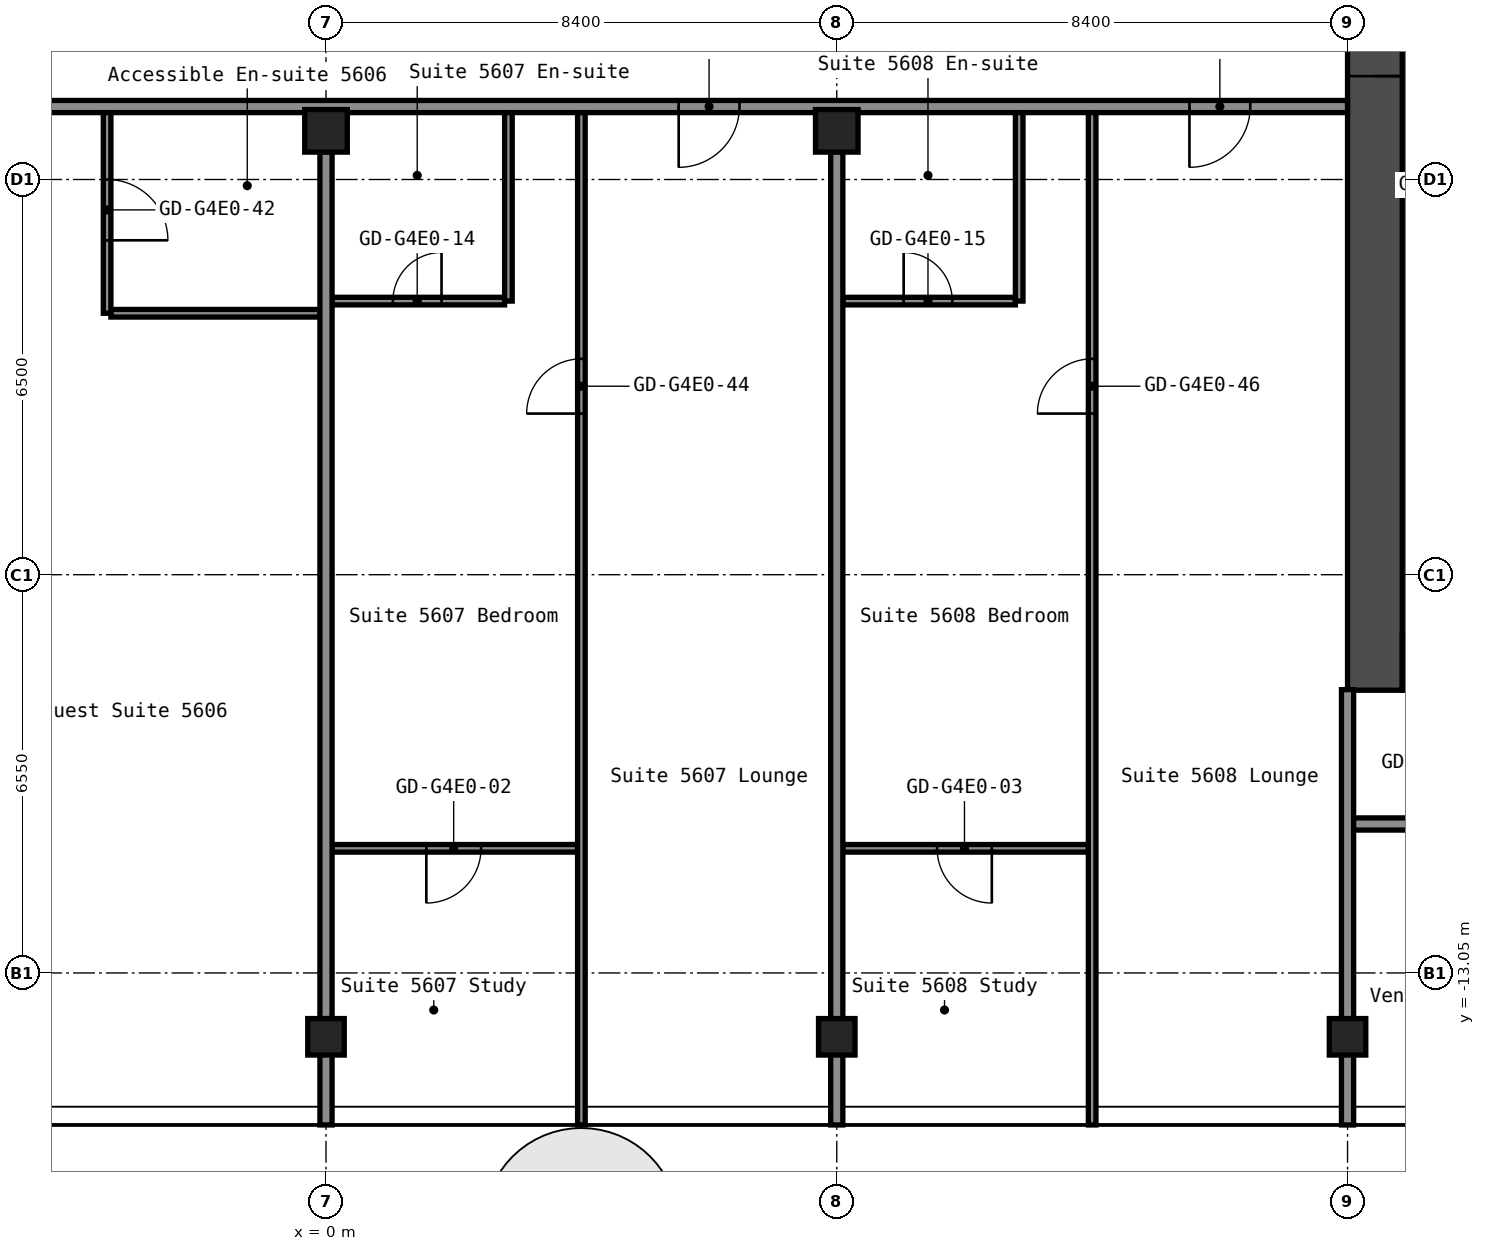
"""IFC4 building model, lengths in metres.
Left out: names, types, materials, properties, quantities, classifications, styles, units other than length and angle.
Written with IfcOpenShell. Run it as: python <this file> out.ifc"""

import sys

from ifc_helpers import new_model, si_unit, direction, frame, frame_2d, origin, origin_2d, place, context, subcontext, project, spatial, rectangle, hollow_rectangle, extrude, element, fill, save


model = new_model("IFC4")
c1 = context("Model", 3, precision=1e-05, world=origin(), true_north=direction((0.0, 1.0)))
c2 = subcontext(c1, "Body", "Model", "MODEL_VIEW")
j1 = project(units=[si_unit("LENGTHUNIT", "METRE"), si_unit("PLANEANGLEUNIT", "RADIAN")], contexts=[c1])
p1 = place(None, origin())
s1 = spatial("IfcSite", under=j1, at=p1, CompositionType="ELEMENT")
p2 = place(p1, origin())
s2 = spatial("IfcBuilding", under=s1, at=p2, CompositionType="ELEMENT")
p3 = place(p2, frame((0.0, 0.0, 199.4)))
s3 = spatial("IfcBuildingStorey", under=s2, at=p3, CompositionType="ELEMENT", Elevation=199.4)
p4 = place(p3, frame((0.0, -14.1, 0.0), z_axis=(0.0, 0.0, 1.0), x_axis=(1.0, 0.0, 0.0)))
e1 = element("IfcColumn", 1, at=p4, inside=s3, PredefinedType="COLUMN", context=c2, shape_type="SweptSolid", body=[
    extrude(hollow_rectangle(XDim=0.6, YDim=0.6, WallThickness=0.025, InnerFilletRadius=0.038, OuterFilletRadius=0.062, at=origin_2d()), origin(), (0.0, 0.0, 1.0), 2.75),
])
p5 = place(p3, frame((0.0, 0.8, 0.0), z_axis=(0.0, 0.0, 1.0), x_axis=(1.0, 0.0, 0.0)))
e2 = element("IfcColumn", 2, at=p5, inside=s3, PredefinedType="COLUMN", context=c2, shape_type="SweptSolid", body=[
    extrude(hollow_rectangle(XDim=0.7, YDim=0.7, WallThickness=0.028, at=origin_2d()), origin(), (0.0, 0.0, 1.0), 2.75),
])
p6 = place(p3, frame((8.4, -14.1, 0.0), z_axis=(0.0, 0.0, 1.0), x_axis=(1.0, 0.0, 0.0)))
e3 = element("IfcColumn", 3, at=p6, inside=s3, PredefinedType="COLUMN", context=c2, shape_type="SweptSolid", body=[
    extrude(hollow_rectangle(XDim=0.6, YDim=0.6, WallThickness=0.025, InnerFilletRadius=0.038, OuterFilletRadius=0.062, at=origin_2d()), origin(), (0.0, 0.0, 1.0), 2.75),
])
p7 = place(p3, frame((8.4, 0.8, 0.0), z_axis=(0.0, 0.0, 1.0), x_axis=(1.0, 0.0, 0.0)))
e4 = element("IfcColumn", 4, at=p7, inside=s3, PredefinedType="COLUMN", context=c2, shape_type="SweptSolid", body=[
    extrude(hollow_rectangle(XDim=0.7, YDim=0.7, WallThickness=0.028, at=origin_2d()), origin(), (0.0, 0.0, 1.0), 2.75),
])
p8 = place(p3, frame((16.8, -14.1, 0.0), z_axis=(0.0, 0.0, 1.0), x_axis=(1.0, 0.0, 0.0)))
e5 = element("IfcColumn", 5, at=p8, inside=s3, PredefinedType="COLUMN", context=c2, shape_type="SweptSolid", body=[
    extrude(hollow_rectangle(XDim=0.6, YDim=0.6, WallThickness=0.025, InnerFilletRadius=0.038, OuterFilletRadius=0.062, at=origin_2d()), origin(), (0.0, 0.0, 1.0), 2.75),
])
p9 = place(p3, frame((17.25, -8.4, 0.0), z_axis=(0.0, 0.0, 1.0), x_axis=(0.0, 1.0, 0.0)))
e6 = element("IfcWall", 6, at=p9, inside=s3, PredefinedType="SHEAR", context=c2, shape_type="SweptSolid", body=[
    extrude(rectangle(XDim=16.8, YDim=0.9, at=frame_2d((8.4, 0.0))), origin(), (0.0, 0.0, 1.0), 2.75),
])
p10 = place(p9, frame((10.1, 0.0, 0.0)))
e7 = element("IfcOpeningElement", 7, at=p10, cuts=e6, PredefinedType="OPENING", context=c2, shape_type="SweptSolid", body=[
    extrude(rectangle(XDim=1.6, YDim=2.1, at=frame_2d((0.8, 1.05))), frame((0.0, 0.46, 0.0), z_axis=(0.0, -1.0, 0.0), x_axis=(1.0, 0.0, 0.0)), (0.0, 0.0, 1.0), 0.92),
])
p11 = place(p3, frame((17.7, -7.95, 0.0), z_axis=(0.0, 0.0, 1.0), x_axis=(1.0, 0.0, 0.0)))
e8 = element("IfcWall", 8, at=p11, inside=s3, PredefinedType="SHEAR", context=c2, shape_type="SweptSolid", body=[
    extrude(rectangle(XDim=15.0, YDim=0.9, at=frame_2d((7.5, 0.0))), origin(), (0.0, 0.0, 1.0), 2.75),
])
p12 = place(p11, frame((2.55, 0.0, 0.0)))
e9 = element("IfcOpeningElement", 9, at=p12, cuts=e8, PredefinedType="OPENING", context=c2, shape_type="SweptSolid", body=[
    extrude(rectangle(XDim=1.0, YDim=2.1, at=frame_2d((0.5, 1.05))), frame((0.0, 0.46, 0.0), z_axis=(0.0, -1.0, 0.0), x_axis=(1.0, 0.0, 0.0)), (0.0, 0.0, 1.0), 0.92),
])
p13 = place(p3, frame((0.1, -11.0, 0.0), z_axis=(0.0, 0.0, 1.0), x_axis=(1.0, 0.0, 0.0)))
e10 = element("IfcWall", 10, at=p13, inside=s3, PredefinedType="PARTITIONING", context=c2, shape_type="SweptSolid", body=[
    extrude(rectangle(XDim=4.037, YDim=0.125, at=frame_2d((2.019, 0.0))), origin(), (0.0, 0.0, 1.0), 2.75),
])
p14 = place(p13, frame((1.55, 0.0, 0.0)))
e11 = element("IfcOpeningElement", 11, at=p14, cuts=e10, PredefinedType="OPENING", context=c2, shape_type="SweptSolid", body=[
    extrude(rectangle(XDim=0.9, YDim=2.1, at=frame_2d((0.45, 1.05))), frame((0.0, 0.073, 0.0), z_axis=(0.0, -1.0, 0.0), x_axis=(1.0, 0.0, 0.0)), (0.0, 0.0, 1.0), 0.145),
])
p15 = place(p3, frame((8.5, -11.0, 0.0), z_axis=(0.0, 0.0, 1.0), x_axis=(1.0, 0.0, 0.0)))
e12 = element("IfcWall", 12, at=p15, inside=s3, PredefinedType="PARTITIONING", context=c2, shape_type="SweptSolid", body=[
    extrude(rectangle(XDim=4.038, YDim=0.125, at=frame_2d((2.019, 0.0))), origin(), (0.0, 0.0, 1.0), 2.75),
])
p16 = place(p15, frame((1.55, 0.0, 0.0)))
e13 = element("IfcOpeningElement", 13, at=p16, cuts=e12, PredefinedType="OPENING", context=c2, shape_type="SweptSolid", body=[
    extrude(rectangle(XDim=0.9, YDim=2.1, at=frame_2d((0.45, 1.05))), frame((0.0, 0.073, 0.0), z_axis=(0.0, -1.0, 0.0), x_axis=(1.0, 0.0, 0.0)), (0.0, 0.0, 1.0), 0.145),
])
p17 = place(p3, frame((16.8, -10.6, 0.0), z_axis=(0.0, 0.0, 1.0), x_axis=(1.0, 0.0, 0.0)))
e14 = element("IfcWall", 14, at=p17, inside=s3, PredefinedType="PARTITIONING", context=c2, shape_type="SweptSolid", body=[
    extrude(rectangle(XDim=21.3, YDim=0.2, at=frame_2d((10.65, 0.0))), origin(), (0.0, 0.0, 1.0), 2.75),
])
p18 = place(p17, frame((1.06, 0.0, 0.0)))
e15 = element("IfcOpeningElement", 15, at=p18, cuts=e14, PredefinedType="OPENING", context=c2, shape_type="SweptSolid", body=[
    extrude(rectangle(XDim=0.9, YDim=2.1, at=frame_2d((0.45, 1.05))), frame((0.0, 0.11, 0.0), z_axis=(0.0, -1.0, 0.0), x_axis=(1.0, 0.0, 0.0)), (0.0, 0.0, 1.0), 0.22),
])
p19 = place(p17, frame((5.26, 0.0, 0.0)))
e16 = element("IfcOpeningElement", 16, at=p19, cuts=e14, PredefinedType="OPENING", context=c2, shape_type="SweptSolid", body=[
    extrude(rectangle(XDim=0.9, YDim=2.1, at=frame_2d((0.45, 1.05))), frame((0.0, 0.11, 0.0), z_axis=(0.0, -1.0, 0.0), x_axis=(1.0, 0.0, 0.0)), (0.0, 0.0, 1.0), 0.22),
])
p20 = place(p17, frame((9.63, 0.0, 0.0)))
e17 = element("IfcOpeningElement", 17, at=p20, cuts=e14, PredefinedType="OPENING", context=c2, shape_type="SweptSolid", body=[
    extrude(rectangle(XDim=0.9, YDim=2.1, at=frame_2d((0.45, 1.05))), frame((0.0, 0.11, 0.0), z_axis=(0.0, -1.0, 0.0), x_axis=(1.0, 0.0, 0.0)), (0.0, 0.0, 1.0), 0.22),
])
p21 = place(p17, frame((13.83, 0.0, 0.0)))
e18 = element("IfcOpeningElement", 18, at=p21, cuts=e14, PredefinedType="OPENING", context=c2, shape_type="SweptSolid", body=[
    extrude(rectangle(XDim=0.9, YDim=2.1, at=frame_2d((0.45, 1.05))), frame((0.0, 0.11, 0.0), z_axis=(0.0, -1.0, 0.0), x_axis=(1.0, 0.0, 0.0)), (0.0, 0.0, 1.0), 0.22),
])
p22 = place(p17, frame((18.45, 0.0, 0.0)))
e19 = element("IfcOpeningElement", 19, at=p22, cuts=e14, PredefinedType="OPENING", context=c2, shape_type="SweptSolid", body=[
    extrude(rectangle(XDim=0.9, YDim=2.1, at=frame_2d((0.45, 1.05))), frame((0.0, 0.11, 0.0), z_axis=(0.0, -1.0, 0.0), x_axis=(1.0, 0.0, 0.0)), (0.0, 0.0, 1.0), 0.22),
])
p23 = place(p3, frame((-3.538, -2.2, 0.0), z_axis=(0.0, 0.0, 1.0), x_axis=(1.0, 0.0, 0.0)))
e20 = element("IfcWall", 20, at=p23, inside=s3, PredefinedType="PARTITIONING", context=c2, shape_type="SweptSolid", body=[
    extrude(rectangle(XDim=3.438, YDim=0.125, at=frame_2d((1.719, 0.0))), origin(), (0.0, 0.0, 1.0), 2.75),
])
p24 = place(p3, frame((0.1, -2.0, 0.0), z_axis=(0.0, 0.0, 1.0), x_axis=(1.0, 0.0, 0.0)))
e21 = element("IfcWall", 21, at=p24, inside=s3, PredefinedType="PARTITIONING", context=c2, shape_type="SweptSolid", body=[
    extrude(rectangle(XDim=2.837, YDim=0.125, at=frame_2d((1.419, 0.0))), origin(), (0.0, 0.0, 1.0), 2.75),
])
p25 = place(p24, frame((1.0, 0.0, 0.0)))
e22 = element("IfcOpeningElement", 22, at=p25, cuts=e21, PredefinedType="OPENING", context=c2, shape_type="SweptSolid", body=[
    extrude(rectangle(XDim=0.8, YDim=2.1, at=frame_2d((0.4, 1.05))), frame((0.0, 0.073, 0.0), z_axis=(0.0, -1.0, 0.0), x_axis=(1.0, 0.0, 0.0)), (0.0, 0.0, 1.0), 0.145),
])
p26 = place(p3, frame((8.5, -2.0, 0.0), z_axis=(0.0, 0.0, 1.0), x_axis=(1.0, 0.0, 0.0)))
e23 = element("IfcWall", 23, at=p26, inside=s3, PredefinedType="PARTITIONING", context=c2, shape_type="SweptSolid", body=[
    extrude(rectangle(XDim=2.837, YDim=0.125, at=frame_2d((1.419, 0.0))), origin(), (0.0, 0.0, 1.0), 2.75),
])
p27 = place(p26, frame((1.0, 0.0, 0.0)))
e24 = element("IfcOpeningElement", 24, at=p27, cuts=e23, PredefinedType="OPENING", context=c2, shape_type="SweptSolid", body=[
    extrude(rectangle(XDim=0.8, YDim=2.1, at=frame_2d((0.4, 1.05))), frame((0.0, 0.073, 0.0), z_axis=(0.0, -1.0, 0.0), x_axis=(1.0, 0.0, 0.0)), (0.0, 0.0, 1.0), 0.145),
])
p28 = place(p3, frame((-16.8, 1.2, 0.0), z_axis=(0.0, 0.0, 1.0), x_axis=(1.0, 0.0, 0.0)))
e25 = element("IfcWall", 25, at=p28, inside=s3, PredefinedType="PARTITIONING", context=c2, shape_type="SweptSolid", body=[
    extrude(rectangle(XDim=33.6, YDim=0.2, at=frame_2d((16.8, 0.0))), origin(), (0.0, 0.0, 1.0), 2.75),
])
p29 = place(p28, frame((1.6, 0.0, 0.0)))
e26 = element("IfcOpeningElement", 26, at=p29, cuts=e25, PredefinedType="OPENING", context=c2, shape_type="SweptSolid", body=[
    extrude(rectangle(XDim=1.0, YDim=2.1, at=frame_2d((0.5, 1.05))), frame((0.0, 0.11, 0.0), z_axis=(0.0, -1.0, 0.0), x_axis=(1.0, 0.0, 0.0)), (0.0, 0.0, 1.0), 0.22),
])
p30 = place(p28, frame((10.3, 0.0, 0.0)))
e27 = element("IfcOpeningElement", 27, at=p30, cuts=e25, PredefinedType="OPENING", context=c2, shape_type="SweptSolid", body=[
    extrude(rectangle(XDim=1.0, YDim=2.1, at=frame_2d((0.5, 1.05))), frame((0.0, 0.11, 0.0), z_axis=(0.0, -1.0, 0.0), x_axis=(1.0, 0.0, 0.0)), (0.0, 0.0, 1.0), 0.22),
])
p31 = place(p28, frame((22.6, 0.0, 0.0)))
e28 = element("IfcOpeningElement", 28, at=p31, cuts=e25, PredefinedType="OPENING", context=c2, shape_type="SweptSolid", body=[
    extrude(rectangle(XDim=1.0, YDim=2.1, at=frame_2d((0.5, 1.05))), frame((0.0, 0.11, 0.0), z_axis=(0.0, -1.0, 0.0), x_axis=(1.0, 0.0, 0.0)), (0.0, 0.0, 1.0), 0.22),
])
p32 = place(p28, frame((31.0, 0.0, 0.0)))
e29 = element("IfcOpeningElement", 29, at=p32, cuts=e25, PredefinedType="OPENING", context=c2, shape_type="SweptSolid", body=[
    extrude(rectangle(XDim=1.0, YDim=2.1, at=frame_2d((0.5, 1.05))), frame((0.0, 0.11, 0.0), z_axis=(0.0, -1.0, 0.0), x_axis=(1.0, 0.0, 0.0)), (0.0, 0.0, 1.0), 0.22),
])
p33 = place(p3, frame((-3.6, -2.2, 0.0), z_axis=(0.0, 0.0, 1.0), x_axis=(0.0, 1.0, 0.0)))
e30 = element("IfcWall", 30, at=p33, inside=s3, PredefinedType="PARTITIONING", context=c2, shape_type="SweptSolid", body=[
    extrude(rectangle(XDim=3.3, YDim=0.125, at=frame_2d((1.65, 0.0))), origin(), (0.0, 0.0, 1.0), 2.75),
])
p34 = place(p33, frame((1.2, 0.0, 0.0)))
e31 = element("IfcOpeningElement", 31, at=p34, cuts=e30, PredefinedType="OPENING", context=c2, shape_type="SweptSolid", body=[
    extrude(rectangle(XDim=1.0, YDim=2.1, at=frame_2d((0.5, 1.05))), frame((0.0, 0.073, 0.0), z_axis=(0.0, -1.0, 0.0), x_axis=(1.0, 0.0, 0.0)), (0.0, 0.0, 1.0), 0.145),
])
p35 = place(p3, frame((0.0, -15.55, 0.0), z_axis=(0.0, 0.0, 1.0), x_axis=(0.0, 1.0, 0.0)))
e32 = element("IfcWall", 32, at=p35, inside=s3, PredefinedType="PARTITIONING", context=c2, shape_type="SweptSolid", body=[
    extrude(rectangle(XDim=16.01, YDim=0.2, at=frame_2d((8.005, 0.0))), origin(), (0.0, 0.0, 1.0), 2.75),
])
p36 = place(p3, frame((3.0, -2.0, 0.0), z_axis=(0.0, 0.0, 1.0), x_axis=(0.0, 1.0, 0.0)))
e33 = element("IfcWall", 33, at=p36, inside=s3, PredefinedType="PARTITIONING", context=c2, shape_type="SweptSolid", body=[
    extrude(rectangle(XDim=3.1, YDim=0.125, at=frame_2d((1.55, 0.0))), origin(), (0.0, 0.0, 1.0), 2.75),
])
p37 = place(p3, frame((4.2, -15.55, 0.0), z_axis=(0.0, 0.0, 1.0), x_axis=(0.0, 1.0, 0.0)))
e34 = element("IfcWall", 34, at=p37, inside=s3, PredefinedType="PARTITIONING", context=c2, shape_type="SweptSolid", body=[
    extrude(rectangle(XDim=16.65, YDim=0.125, at=frame_2d((8.325, 0.0))), origin(), (0.0, 0.0, 1.0), 2.75),
])
p38 = place(p37, frame((11.7, 0.0, 0.0)))
e35 = element("IfcOpeningElement", 35, at=p38, cuts=e34, PredefinedType="OPENING", context=c2, shape_type="SweptSolid", body=[
    extrude(rectangle(XDim=0.9, YDim=2.1, at=frame_2d((0.45, 1.05))), frame((0.0, 0.073, 0.0), z_axis=(0.0, -1.0, 0.0), x_axis=(1.0, 0.0, 0.0)), (0.0, 0.0, 1.0), 0.145),
])
p39 = place(p3, frame((8.4, -15.55, 0.0), z_axis=(0.0, 0.0, 1.0), x_axis=(0.0, 1.0, 0.0)))
e36 = element("IfcWall", 36, at=p39, inside=s3, PredefinedType="PARTITIONING", context=c2, shape_type="SweptSolid", body=[
    extrude(rectangle(XDim=16.01, YDim=0.2, at=frame_2d((8.005, 0.0))), origin(), (0.0, 0.0, 1.0), 2.75),
])
p40 = place(p3, frame((11.4, -2.0, 0.0), z_axis=(0.0, 0.0, 1.0), x_axis=(0.0, 1.0, 0.0)))
e37 = element("IfcWall", 37, at=p40, inside=s3, PredefinedType="PARTITIONING", context=c2, shape_type="SweptSolid", body=[
    extrude(rectangle(XDim=3.1, YDim=0.125, at=frame_2d((1.55, 0.0))), origin(), (0.0, 0.0, 1.0), 2.75),
])
p41 = place(p3, frame((12.6, -15.55, 0.0), z_axis=(0.0, 0.0, 1.0), x_axis=(0.0, 1.0, 0.0)))
e38 = element("IfcWall", 38, at=p41, inside=s3, PredefinedType="PARTITIONING", context=c2, shape_type="SweptSolid", body=[
    extrude(rectangle(XDim=16.65, YDim=0.125, at=frame_2d((8.325, 0.0))), origin(), (0.0, 0.0, 1.0), 2.75),
])
p42 = place(p41, frame((11.7, 0.0, 0.0)))
e39 = element("IfcOpeningElement", 39, at=p42, cuts=e38, PredefinedType="OPENING", context=c2, shape_type="SweptSolid", body=[
    extrude(rectangle(XDim=0.9, YDim=2.1, at=frame_2d((0.45, 1.05))), frame((0.0, 0.073, 0.0), z_axis=(0.0, -1.0, 0.0), x_axis=(1.0, 0.0, 0.0)), (0.0, 0.0, 1.0), 0.145),
])
p43 = place(p3, frame((16.8, -15.55, 0.0), z_axis=(0.0, 0.0, 1.0), x_axis=(0.0, 1.0, 0.0)))
e40 = element("IfcWall", 40, at=p43, inside=s3, PredefinedType="PARTITIONING", context=c2, shape_type="SweptSolid", body=[
    extrude(rectangle(XDim=7.16, YDim=0.2, at=frame_2d((3.58, 0.0))), origin(), (0.0, 0.0, 1.0), 2.75),
])
p44 = place(p10, origin())
e41 = element("IfcDoor", 41, at=p44, inside=s3, OperationType="DOUBLE_DOOR_SINGLE_SWING", PredefinedType="DOOR", context=c2, shape_type="SweptSolid", body=[
    extrude(rectangle(XDim=1.6, YDim=2.1, at=frame_2d((0.8, 1.05))), frame((0.0, 0.025, 0.0), z_axis=(0.0, -1.0, 0.0), x_axis=(1.0, 0.0, 0.0)), (0.0, 0.0, 1.0), 0.05),
])
fill(e7, e41)
p45 = place(p14, origin())
e42 = element("IfcDoor", 42, at=p45, inside=s3, OperationType="SINGLE_SWING_LEFT", PredefinedType="DOOR", context=c2, shape_type="SweptSolid", body=[
    extrude(rectangle(XDim=0.9, YDim=2.1, at=frame_2d((0.45, 1.05))), frame((0.0, 0.025, 0.0), z_axis=(0.0, -1.0, 0.0), x_axis=(1.0, 0.0, 0.0)), (0.0, 0.0, 1.0), 0.05),
])
fill(e11, e42)
p46 = place(p16, origin())
e43 = element("IfcDoor", 43, at=p46, inside=s3, OperationType="SINGLE_SWING_RIGHT", PredefinedType="DOOR", context=c2, shape_type="SweptSolid", body=[
    extrude(rectangle(XDim=0.9, YDim=2.1, at=frame_2d((0.45, 1.05))), frame((0.0, 0.025, 0.0), z_axis=(0.0, -1.0, 0.0), x_axis=(1.0, 0.0, 0.0)), (0.0, 0.0, 1.0), 0.05),
])
fill(e13, e43)
p47 = place(p25, origin())
e44 = element("IfcDoor", 44, at=p47, inside=s3, OperationType="SINGLE_SWING_LEFT", PredefinedType="DOOR", context=c2, shape_type="SweptSolid", body=[
    extrude(rectangle(XDim=0.8, YDim=2.1, at=frame_2d((0.4, 1.05))), frame((0.0, 0.025, 0.0), z_axis=(0.0, -1.0, 0.0), x_axis=(1.0, 0.0, 0.0)), (0.0, 0.0, 1.0), 0.05),
])
fill(e22, e44)
p48 = place(p27, origin())
e45 = element("IfcDoor", 45, at=p48, inside=s3, OperationType="SINGLE_SWING_RIGHT", PredefinedType="DOOR", context=c2, shape_type="SweptSolid", body=[
    extrude(rectangle(XDim=0.8, YDim=2.1, at=frame_2d((0.4, 1.05))), frame((0.0, 0.025, 0.0), z_axis=(0.0, -1.0, 0.0), x_axis=(1.0, 0.0, 0.0)), (0.0, 0.0, 1.0), 0.05),
])
fill(e24, e45)
p49 = place(p31, origin())
e46 = element("IfcDoor", 46, at=p49, inside=s3, OperationType="SINGLE_SWING_LEFT", PredefinedType="DOOR", context=c2, shape_type="SweptSolid", body=[
    extrude(rectangle(XDim=1.0, YDim=2.1, at=frame_2d((0.5, 1.05))), frame((0.0, 0.025, 0.0), z_axis=(0.0, -1.0, 0.0), x_axis=(1.0, 0.0, 0.0)), (0.0, 0.0, 1.0), 0.05),
])
fill(e28, e46)
p50 = place(p32, origin())
e47 = element("IfcDoor", 47, at=p50, inside=s3, OperationType="SINGLE_SWING_LEFT", PredefinedType="DOOR", context=c2, shape_type="SweptSolid", body=[
    extrude(rectangle(XDim=1.0, YDim=2.1, at=frame_2d((0.5, 1.05))), frame((0.0, 0.025, 0.0), z_axis=(0.0, -1.0, 0.0), x_axis=(1.0, 0.0, 0.0)), (0.0, 0.0, 1.0), 0.05),
])
fill(e29, e47)
p51 = place(p34, origin())
e48 = element("IfcDoor", 48, at=p51, inside=s3, OperationType="SINGLE_SWING_LEFT", PredefinedType="DOOR", context=c2, shape_type="SweptSolid", body=[
    extrude(rectangle(XDim=1.0, YDim=2.1, at=frame_2d((0.5, 1.05))), frame((0.0, 0.025, 0.0), z_axis=(0.0, -1.0, 0.0), x_axis=(1.0, 0.0, 0.0)), (0.0, 0.0, 1.0), 0.05),
])
fill(e31, e48)
p52 = place(p38, origin())
e49 = element("IfcDoor", 49, at=p52, inside=s3, OperationType="SINGLE_SWING_RIGHT", PredefinedType="DOOR", context=c2, shape_type="SweptSolid", body=[
    extrude(rectangle(XDim=0.9, YDim=2.1, at=frame_2d((0.45, 1.05))), frame((0.0, 0.025, 0.0), z_axis=(0.0, -1.0, 0.0), x_axis=(1.0, 0.0, 0.0)), (0.0, 0.0, 1.0), 0.05),
])
fill(e35, e49)
p53 = place(p42, origin())
e50 = element("IfcDoor", 50, at=p53, inside=s3, OperationType="SINGLE_SWING_RIGHT", PredefinedType="DOOR", context=c2, shape_type="SweptSolid", body=[
    extrude(rectangle(XDim=0.9, YDim=2.1, at=frame_2d((0.45, 1.05))), frame((0.0, 0.025, 0.0), z_axis=(0.0, -1.0, 0.0), x_axis=(1.0, 0.0, 0.0)), (0.0, 0.0, 1.0), 0.05),
])
fill(e39, e50)
save(model, sys.argv[1])
